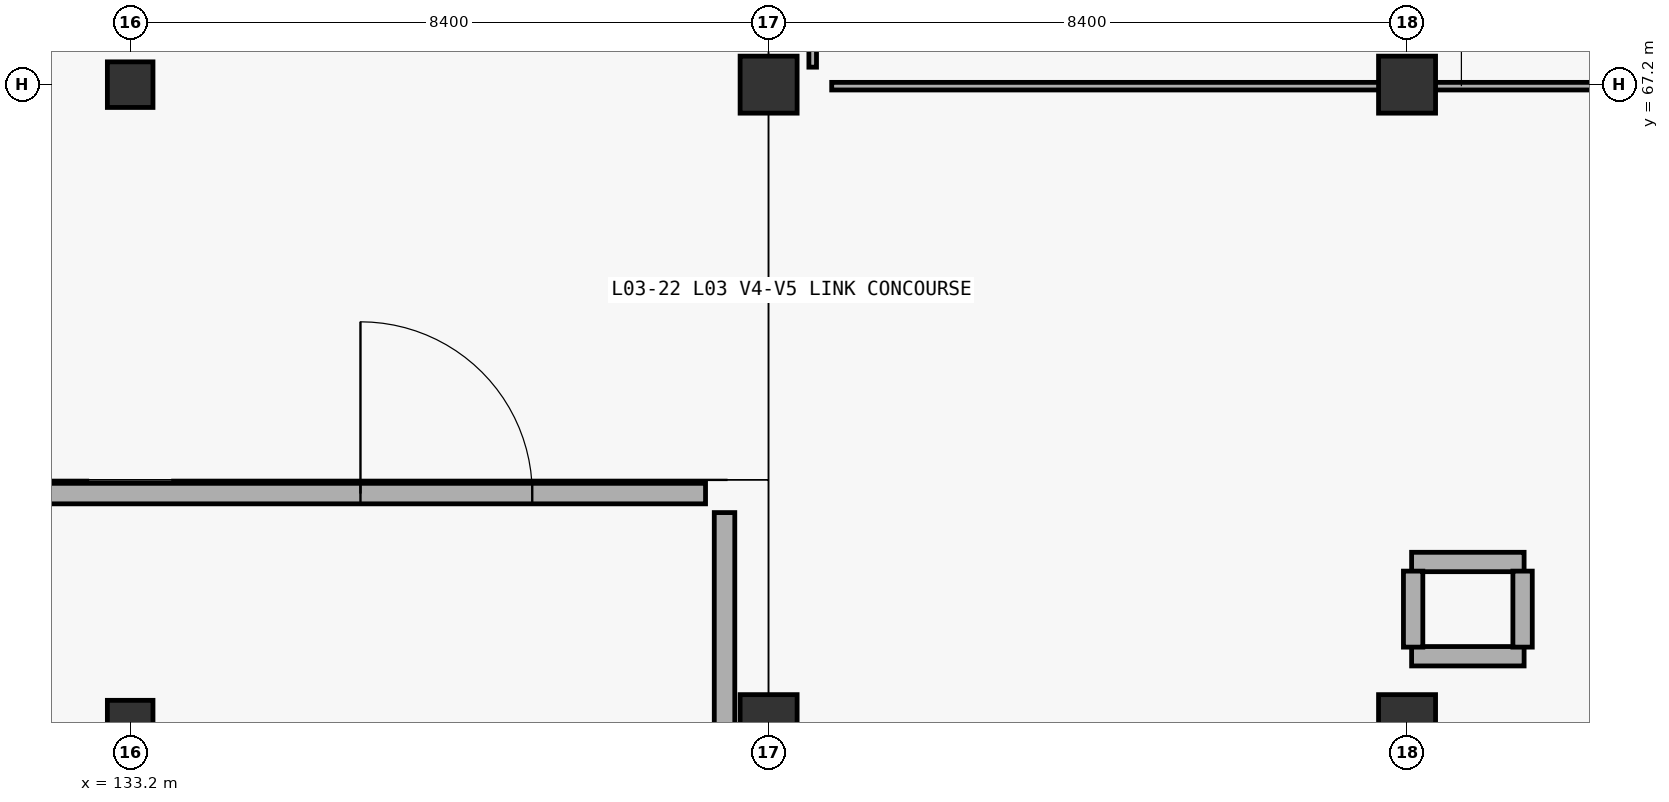
"""IFC4 building model, lengths in metres.
Left out: names, types, materials, properties, quantities, classifications, styles, units other than length and angle.
Written with IfcOpenShell. Run it as: python <this file> out.ifc"""

import sys

from ifc_helpers import new_model, si_unit, direction, frame, frame_2d, origin, origin_2d, place, context, subcontext, project, spatial, rectangle, extrude, element, fill, save


model = new_model("IFC4")
c1 = context("Model", 3, precision=1e-05, world=origin(), true_north=direction((0.0, 1.0)))
c2 = subcontext(c1, "Body", "Model", "MODEL_VIEW")
j1 = project(units=[si_unit("LENGTHUNIT", "METRE"), si_unit("PLANEANGLEUNIT", "RADIAN")], contexts=[c1])
p1 = place(None, origin())
s1 = spatial("IfcSite", under=j1, at=p1, CompositionType="ELEMENT")
p2 = place(p1, origin())
s2 = spatial("IfcBuilding", under=s1, at=p2, CompositionType="ELEMENT")
p3 = place(p2, frame((0.0, 0.0, 15.6)))
s3 = spatial("IfcBuildingStorey", under=s2, at=p3, CompositionType="ELEMENT", Elevation=15.6)
for number, where, z_axis, x_axis in (
    (1, (133.2, 58.8, 0.0), (0.0, 0.0, 1.0), (1.0, 0.0, 0.0)),
    (2, (133.2, 67.2, 0.0), (0.0, 0.0, 1.0), (1.0, 0.0, 0.0)),
):
    element("IfcColumn", number, at=place(p3, frame(where, z_axis=z_axis, x_axis=x_axis)), inside=s3, PredefinedType="COLUMN", context=c2, shape_type="SweptSolid", body=[
        extrude(rectangle(XDim=0.6, YDim=0.6, at=origin_2d()), origin(), (0.0, 0.0, 1.0), 5.1),
    ])
for number, where, z_axis, x_axis in (
    (3, (141.6, 58.8, 0.0), (0.0, 0.0, 1.0), (1.0, 0.0, 0.0)),
    (4, (141.6, 67.2, 0.0), (0.0, 0.0, 1.0), (1.0, 0.0, 0.0)),
    (5, (150.0, 58.8, 0.0), (0.0, 0.0, 1.0), (1.0, 0.0, 0.0)),
    (6, (150.0, 67.2, 0.0), (0.0, 0.0, 1.0), (1.0, 0.0, 0.0)),
):
    element("IfcColumn", number, at=place(p3, frame(where, z_axis=z_axis, x_axis=x_axis)), inside=s3, PredefinedType="COLUMN", context=c2, shape_type="SweptSolid", body=[
        extrude(rectangle(XDim=0.75, YDim=0.75, at=origin_2d()), origin(), (0.0, 0.0, 1.0), 5.1),
    ])
for number, where, z_axis, x_axis in (
    (7, (150.06, 60.92, 0.0), (0.0, 0.0, 1.0), (1.0, 0.0, 0.0)),
    (8, (150.06, 59.68, 0.0), (0.0, 0.0, 1.0), (1.0, 0.0, 0.0)),
):
    element("IfcWall", number, at=place(p3, frame(where, z_axis=z_axis, x_axis=x_axis)), inside=s3, PredefinedType="PARTITIONING", context=c2, shape_type="SweptSolid", body=[
        extrude(rectangle(XDim=1.48, YDim=0.255, at=frame_2d((0.74, 0.0))), origin(), (0.0, 0.0, 1.0), 3.91),
    ])
p4 = place(p3, frame((150.08, 59.8, 0.0), z_axis=(0.0, 0.0, 1.0), x_axis=(0.0, 1.0, 0.0)))
e9 = element("IfcWall", 9, at=p4, inside=s3, PredefinedType="PARTITIONING", context=c2, shape_type="SweptSolid", body=[
    extrude(rectangle(XDim=1.0, YDim=0.255, at=frame_2d((0.5, 0.0))), origin(), (0.0, 0.0, 1.0), 3.91),
])
p5 = place(p3, frame((151.52, 59.8, 0.0), z_axis=(0.0, 0.0, 1.0), x_axis=(0.0, 1.0, 0.0)))
e10 = element("IfcWall", 10, at=p5, inside=s3, PredefinedType="PARTITIONING", context=c2, shape_type="SweptSolid", body=[
    extrude(rectangle(XDim=1.0, YDim=0.255, at=frame_2d((0.5, 0.0))), origin(), (0.0, 0.0, 1.0), 4.72),
])
p6 = place(p3, frame((128.83, 61.82, 0.0), z_axis=(0.0, 0.0, 1.0), x_axis=(1.0, 0.0, 0.0)))
e11 = element("IfcWall", 11, at=p6, inside=s3, PredefinedType="PARTITIONING", context=c2, shape_type="SweptSolid", body=[
    extrude(rectangle(XDim=11.94, YDim=0.27, at=frame_2d((5.97, 0.0))), origin(), (0.0, 0.0, 1.0), 4.12),
])
p7 = place(p6, frame((7.4, 0.0, 0.0)))
e12 = element("IfcOpeningElement", 12, at=p7, cuts=e11, PredefinedType="OPENING", context=c2, shape_type="SweptSolid", body=[
    extrude(rectangle(XDim=2.26, YDim=2.68, at=frame_2d((1.13, 1.34))), frame((0.0, 0.145, 0.0), z_axis=(0.0, -1.0, 0.0), x_axis=(1.0, 0.0, 0.0)), (0.0, 0.0, 1.0), 0.29),
])
p8 = place(p3, frame((141.02, 14.03, 0.0), z_axis=(0.0, 0.0, 1.0), x_axis=(0.0, 1.0, 0.0)))
e13 = element("IfcWall", 13, at=p8, inside=s3, PredefinedType="PARTITIONING", context=c2, shape_type="SweptSolid", body=[
    extrude(rectangle(XDim=47.54, YDim=0.27, at=frame_2d((23.77, 0.0))), origin(), (0.0, 0.0, 1.0), 3.91),
])
p9 = place(p8, frame((30.65, 0.0, 0.9)))
e14 = element("IfcOpeningElement", 14, at=p9, cuts=e13, PredefinedType="OPENING", context=c2, shape_type="SweptSolid", body=[
    extrude(rectangle(XDim=1.86, YDim=1.28, at=frame_2d((0.93, 0.64))), frame((0.0, 0.145, 0.0), z_axis=(0.0, -1.0, 0.0), x_axis=(1.0, 0.0, 0.0)), (0.0, 0.0, 1.0), 0.29),
])
p10 = place(p3, frame((142.43, 67.18, 0.0), z_axis=(0.0, 0.0, 1.0), x_axis=(1.0, 0.0, 0.0)))
e15 = element("IfcWall", 15, at=p10, inside=s3, PredefinedType="PARTITIONING", context=c2, shape_type="SweptSolid", body=[
    extrude(rectangle(XDim=23.14, YDim=0.1, at=frame_2d((11.57, 0.0))), origin(), (0.0, 0.0, 1.0), 3.81),
])
p11 = place(p10, frame((18.9, 0.0, 0.0)))
e16 = element("IfcOpeningElement", 16, at=p11, cuts=e15, PredefinedType="OPENING", context=c2, shape_type="SweptSolid", body=[
    extrude(rectangle(XDim=2.52, YDim=2.8, at=frame_2d((1.26, 1.4))), frame((0.0, 0.06, 0.0), z_axis=(0.0, -1.0, 0.0), x_axis=(1.0, 0.0, 0.0)), (0.0, 0.0, 1.0), 0.12),
])
p12 = place(p3, frame((142.18, 67.43, 0.0), z_axis=(0.0, 0.0, 1.0), x_axis=(0.0, 1.0, 0.0)))
e17 = element("IfcWall", 17, at=p12, inside=s3, PredefinedType="PARTITIONING", context=c2, shape_type="SweptSolid", body=[
    extrude(rectangle(XDim=7.34, YDim=0.1, at=frame_2d((3.67, 0.0))), origin(), (0.0, 0.0, 1.0), 3.91),
])
p13 = place(p12, frame((2.9, 0.0, 0.9)))
e18 = element("IfcOpeningElement", 18, at=p13, cuts=e17, PredefinedType="OPENING", context=c2, shape_type="SweptSolid", body=[
    extrude(rectangle(XDim=2.16, YDim=1.42, at=frame_2d((1.08, 0.71))), frame((0.0, 0.06, 0.0), z_axis=(0.0, -1.0, 0.0), x_axis=(1.0, 0.0, 0.0)), (0.0, 0.0, 1.0), 0.12),
])
p14 = place(p7, origin())
e19 = element("IfcDoor", 19, at=p14, inside=s3, OperationType="DOUBLE_SWING_LEFT", PredefinedType="DOOR", context=c2, shape_type="SweptSolid", body=[
    extrude(rectangle(XDim=2.26, YDim=2.68, at=frame_2d((1.13, 1.34))), frame((0.0, 0.025, 0.0), z_axis=(0.0, -1.0, 0.0), x_axis=(1.0, 0.0, 0.0)), (0.0, 0.0, 1.0), 0.05),
])
fill(e12, e19)
save(model, sys.argv[1])
